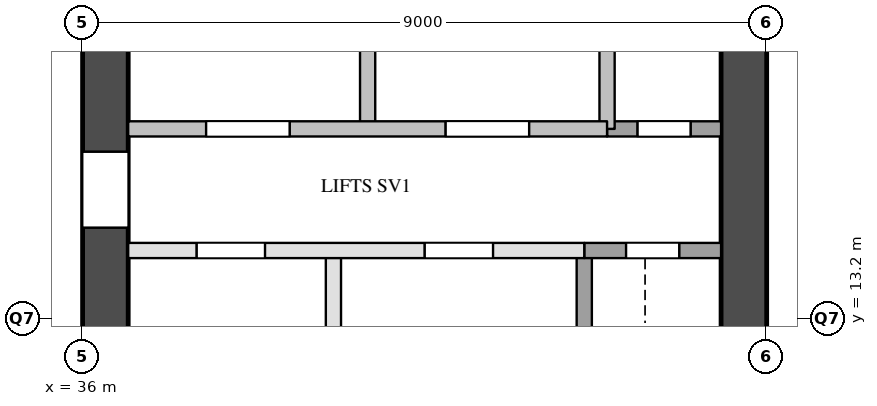
"""IFC4 building model, lengths in metres.
Left out: names, types, materials, properties, quantities, classifications, styles, units other than length and angle.
Written with IfcOpenShell. Run it as: python <this file> out.ifc"""

import sys

from ifc_helpers import new_model, si_unit, direction, frame, frame_2d, origin, place, context, subcontext, project, spatial, rectangle, extrude, element, fill, save


model = new_model("IFC4")
c1 = context("Model", 3, precision=1e-05, world=origin(), true_north=direction((0.0, 1.0)))
c2 = subcontext(c1, "Body", "Model", "MODEL_VIEW")
j1 = project(units=[si_unit("LENGTHUNIT", "METRE"), si_unit("PLANEANGLEUNIT", "RADIAN")], contexts=[c1])
p1 = place(None, origin())
s1 = spatial("IfcSite", under=j1, at=p1, CompositionType="ELEMENT")
p2 = place(p1, origin())
s2 = spatial("IfcBuilding", under=s1, at=p2, CompositionType="ELEMENT")
p3 = place(p2, frame((0.0, 0.0, 100.6)))
s3 = spatial("IfcBuildingStorey", under=s2, at=p3, CompositionType="ELEMENT", Elevation=100.6)
p4 = place(p3, frame((36.3, 9.6, 0.0), z_axis=(0.0, 0.0, 1.0), x_axis=(0.0, 1.0, 0.0)))
e1 = element("IfcWall", 1, at=p4, inside=s3, PredefinedType="SHEAR", context=c2, shape_type="SweptSolid", body=[
    extrude(rectangle(XDim=12.3, YDim=0.6, at=frame_2d((6.15, 0.0))), origin(), (0.0, 0.0, 1.0), 3.5),
])
p5 = place(p4, frame((0.525, 0.0, 0.0)))
e2 = element("IfcOpeningElement", 2, at=p5, cuts=e1, PredefinedType="OPENING", context=c2, shape_type="SweptSolid", body=[
    extrude(rectangle(XDim=1.2, YDim=2.1, at=frame_2d((0.6, 1.05))), frame((0.0, 0.31, 0.0), z_axis=(0.0, -1.0, 0.0), x_axis=(1.0, 0.0, 0.0)), (0.0, 0.0, 1.0), 0.62),
])
p6 = place(p4, frame((4.8, 0.0, 0.0)))
e3 = element("IfcOpeningElement", 3, at=p6, cuts=e1, PredefinedType="OPENING", context=c2, shape_type="SweptSolid", body=[
    extrude(rectangle(XDim=1.0, YDim=2.1, at=frame_2d((0.5, 1.05))), frame((0.0, 0.31, 0.0), z_axis=(0.0, -1.0, 0.0), x_axis=(1.0, 0.0, 0.0)), (0.0, 0.0, 1.0), 0.62),
])
p7 = place(p3, frame((44.7, 9.6, 0.0), z_axis=(0.0, 0.0, 1.0), x_axis=(0.0, 1.0, 0.0)))
e4 = element("IfcWall", 4, at=p7, inside=s3, PredefinedType="SHEAR", context=c2, shape_type="SweptSolid", body=[
    extrude(rectangle(XDim=12.3, YDim=0.6, at=frame_2d((6.15, 0.0))), origin(), (0.0, 0.0, 1.0), 3.5),
])
p8 = place(p7, frame((0.8, 0.0, 0.0)))
e5 = element("IfcOpeningElement", 5, at=p8, cuts=e4, PredefinedType="OPENING", context=c2, shape_type="SweptSolid", body=[
    extrude(rectangle(XDim=0.7, YDim=2.1, at=frame_2d((0.35, 1.05))), frame((0.0, 0.31, 0.0), z_axis=(0.0, -1.0, 0.0), x_axis=(1.0, 0.0, 0.0)), (0.0, 0.0, 1.0), 0.62),
])
p9 = place(p3, frame((39.3, 11.9, 0.0), z_axis=(0.0, 0.0, 1.0), x_axis=(0.0, 1.0, 0.0)))
e6 = element("IfcWall", 6, at=p9, inside=s3, PredefinedType="PARTITIONING", context=c2, shape_type="SweptSolid", body=[
    extrude(rectangle(XDim=2.2, YDim=0.2, at=frame_2d((1.1, 0.0))), origin(), (0.0, 0.0, 1.0), 3.5),
])
p10 = place(p3, frame((39.75, 15.7, 0.0), z_axis=(0.0, 0.0, 1.0), x_axis=(0.0, 1.0, 0.0)))
e7 = element("IfcWall", 7, at=p10, inside=s3, PredefinedType="SOLIDWALL", context=c2, shape_type="SweptSolid", body=[
    extrude(rectangle(XDim=4.3, YDim=0.2, at=frame_2d((2.15, 0.0))), origin(), (0.0, 0.0, 1.0), 3.5),
])
p11 = place(p3, frame((42.6, 11.9, 0.0), z_axis=(0.0, 0.0, 1.0), x_axis=(0.0, 1.0, 0.0)))
e8 = element("IfcWall", 8, at=p11, inside=s3, PredefinedType="SOLIDWALL", context=c2, shape_type="SweptSolid", body=[
    extrude(rectangle(XDim=2.2, YDim=0.2, at=frame_2d((1.1, 0.0))), origin(), (0.0, 0.0, 1.0), 3.5),
])
p12 = place(p3, frame((42.9, 15.7, 0.0), z_axis=(0.0, 0.0, 1.0), x_axis=(0.0, 1.0, 0.0)))
e9 = element("IfcWall", 9, at=p12, inside=s3, PredefinedType="SOLIDWALL", context=c2, shape_type="SweptSolid", body=[
    extrude(rectangle(XDim=4.3, YDim=0.2, at=frame_2d((2.15, 0.0))), origin(), (0.0, 0.0, 1.0), 3.5),
])
p13 = place(p3, frame((36.6, 14.1, 0.0), z_axis=(0.0, 0.0, 1.0), x_axis=(1.0, 0.0, 0.0)))
e10 = element("IfcWall", 10, at=p13, inside=s3, PredefinedType="PARTITIONING", context=c2, shape_type="SweptSolid", body=[
    extrude(rectangle(XDim=6.0, YDim=0.2, at=frame_2d((3.0, 0.0))), origin(), (0.0, 0.0, 1.0), 3.5),
])
p14 = place(p13, frame((0.9, 0.0, 0.0)))
e11 = element("IfcOpeningElement", 11, at=p14, cuts=e10, PredefinedType="OPENING", context=c2, shape_type="SweptSolid", body=[
    extrude(rectangle(XDim=0.9, YDim=2.1, at=frame_2d((0.45, 1.05))), frame((0.0, 0.11, 0.0), z_axis=(0.0, -1.0, 0.0), x_axis=(1.0, 0.0, 0.0)), (0.0, 0.0, 1.0), 0.22),
])
p15 = place(p13, frame((3.9, 0.0, 0.0)))
e12 = element("IfcOpeningElement", 12, at=p15, cuts=e10, PredefinedType="OPENING", context=c2, shape_type="SweptSolid", body=[
    extrude(rectangle(XDim=0.9, YDim=2.1, at=frame_2d((0.45, 1.05))), frame((0.0, 0.11, 0.0), z_axis=(0.0, -1.0, 0.0), x_axis=(1.0, 0.0, 0.0)), (0.0, 0.0, 1.0), 0.22),
])
p16 = place(p3, frame((42.6, 14.1, 0.0), z_axis=(0.0, 0.0, 1.0), x_axis=(1.0, 0.0, 0.0)))
e13 = element("IfcWall", 13, at=p16, inside=s3, PredefinedType="SOLIDWALL", context=c2, shape_type="SweptSolid", body=[
    extrude(rectangle(XDim=1.8, YDim=0.2, at=frame_2d((0.9, 0.0))), origin(), (0.0, 0.0, 1.0), 3.5),
])
p17 = place(p16, frame((0.55, 0.0, 0.0)))
e14 = element("IfcOpeningElement", 14, at=p17, cuts=e13, PredefinedType="OPENING", context=c2, shape_type="SweptSolid", body=[
    extrude(rectangle(XDim=0.7, YDim=2.1, at=frame_2d((0.35, 1.05))), frame((0.0, 0.11, 0.0), z_axis=(0.0, -1.0, 0.0), x_axis=(1.0, 0.0, 0.0)), (0.0, 0.0, 1.0), 0.22),
])
p18 = place(p3, frame((42.9, 15.7, 0.0), z_axis=(0.0, 0.0, 1.0), x_axis=(1.0, 0.0, 0.0)))
e15 = element("IfcWall", 15, at=p18, inside=s3, PredefinedType="SOLIDWALL", context=c2, shape_type="SweptSolid", body=[
    extrude(rectangle(XDim=1.5, YDim=0.2, at=frame_2d((0.75, 0.0))), origin(), (0.0, 0.0, 1.0), 3.5),
])
p19 = place(p18, frame((0.4, 0.0, 0.0)))
e16 = element("IfcOpeningElement", 16, at=p19, cuts=e15, PredefinedType="OPENING", context=c2, shape_type="SweptSolid", body=[
    extrude(rectangle(XDim=0.7, YDim=2.1, at=frame_2d((0.35, 1.05))), frame((0.0, 0.11, 0.0), z_axis=(0.0, -1.0, 0.0), x_axis=(1.0, 0.0, 0.0)), (0.0, 0.0, 1.0), 0.22),
])
p20 = place(p3, frame((36.6, 15.7, 0.0), z_axis=(0.0, 0.0, 1.0), x_axis=(1.0, 0.0, 0.0)))
e17 = element("IfcWall", 17, at=p20, inside=s3, PredefinedType="SOLIDWALL", context=c2, shape_type="SweptSolid", body=[
    extrude(rectangle(XDim=6.3, YDim=0.2, at=frame_2d((3.15, 0.0))), origin(), (0.0, 0.0, 1.0), 3.5),
])
p21 = place(p20, frame((1.025, 0.0, 0.0)))
e18 = element("IfcOpeningElement", 18, at=p21, cuts=e17, PredefinedType="OPENING", context=c2, shape_type="SweptSolid", body=[
    extrude(rectangle(XDim=1.1, YDim=2.1, at=frame_2d((0.55, 1.05))), frame((0.0, 0.11, 0.0), z_axis=(0.0, -1.0, 0.0), x_axis=(1.0, 0.0, 0.0)), (0.0, 0.0, 1.0), 0.22),
])
p22 = place(p20, frame((4.175, 0.0, 0.0)))
e19 = element("IfcOpeningElement", 19, at=p22, cuts=e17, PredefinedType="OPENING", context=c2, shape_type="SweptSolid", body=[
    extrude(rectangle(XDim=1.1, YDim=2.1, at=frame_2d((0.55, 1.05))), frame((0.0, 0.11, 0.0), z_axis=(0.0, -1.0, 0.0), x_axis=(1.0, 0.0, 0.0)), (0.0, 0.0, 1.0), 0.22),
])
p23 = place(p21, origin())
e20 = element("IfcDoor", 20, at=p23, inside=s3, OperationType="SINGLE_SWING_LEFT", PredefinedType="DOOR", context=c2, shape_type="SweptSolid", body=[
    extrude(rectangle(XDim=1.1, YDim=2.1, at=frame_2d((0.55, 1.05))), frame((0.0, 0.025, 0.0), z_axis=(0.0, -1.0, 0.0), x_axis=(1.0, 0.0, 0.0)), (0.0, 0.0, 1.0), 0.05),
])
fill(e18, e20)
p24 = place(p22, origin())
e21 = element("IfcDoor", 21, at=p24, inside=s3, OperationType="SINGLE_SWING_RIGHT", PredefinedType="DOOR", context=c2, shape_type="SweptSolid", body=[
    extrude(rectangle(XDim=1.1, YDim=2.1, at=frame_2d((0.55, 1.05))), frame((0.0, 0.025, 0.0), z_axis=(0.0, -1.0, 0.0), x_axis=(1.0, 0.0, 0.0)), (0.0, 0.0, 1.0), 0.05),
])
fill(e19, e21)
p25 = place(p19, origin())
e22 = element("IfcDoor", 22, at=p25, inside=s3, OperationType="SINGLE_SWING_LEFT", PredefinedType="DOOR", context=c2, shape_type="SweptSolid", body=[
    extrude(rectangle(XDim=0.7, YDim=2.1, at=frame_2d((0.35, 1.05))), frame((0.0, 0.025, 0.0), z_axis=(0.0, -1.0, 0.0), x_axis=(1.0, 0.0, 0.0)), (0.0, 0.0, 1.0), 0.05),
])
fill(e16, e22)
p26 = place(p17, origin())
e23 = element("IfcDoor", 23, at=p26, inside=s3, OperationType="SINGLE_SWING_RIGHT", PredefinedType="DOOR", context=c2, shape_type="SweptSolid", body=[
    extrude(rectangle(XDim=0.7, YDim=2.1, at=frame_2d((0.35, 1.05))), frame((0.0, 0.025, 0.0), z_axis=(0.0, -1.0, 0.0), x_axis=(1.0, 0.0, 0.0)), (0.0, 0.0, 1.0), 0.05),
])
fill(e14, e23)
p27 = place(p6, origin())
e24 = element("IfcDoor", 24, at=p27, inside=s3, OperationType="SINGLE_SWING_LEFT", PredefinedType="DOOR", context=c2, shape_type="SweptSolid", body=[
    extrude(rectangle(XDim=1.0, YDim=2.1, at=frame_2d((0.5, 1.05))), frame((0.0, 0.025, 0.0), z_axis=(0.0, -1.0, 0.0), x_axis=(1.0, 0.0, 0.0)), (0.0, 0.0, 1.0), 0.05),
])
fill(e3, e24)
p28 = place(p14, origin())
e25 = element("IfcDoor", 25, at=p28, inside=s3, OperationType="SINGLE_SWING_LEFT", PredefinedType="DOOR", context=c2, shape_type="SweptSolid", body=[
    extrude(rectangle(XDim=0.9, YDim=2.1, at=frame_2d((0.45, 1.05))), frame((0.0, 0.025, 0.0), z_axis=(0.0, -1.0, 0.0), x_axis=(1.0, 0.0, 0.0)), (0.0, 0.0, 1.0), 0.05),
])
fill(e11, e25)
p29 = place(p15, origin())
e26 = element("IfcDoor", 26, at=p29, inside=s3, OperationType="SINGLE_SWING_RIGHT", PredefinedType="DOOR", context=c2, shape_type="SweptSolid", body=[
    extrude(rectangle(XDim=0.9, YDim=2.1, at=frame_2d((0.45, 1.05))), frame((0.0, 0.025, 0.0), z_axis=(0.0, -1.0, 0.0), x_axis=(1.0, 0.0, 0.0)), (0.0, 0.0, 1.0), 0.05),
])
fill(e12, e26)
save(model, sys.argv[1])
